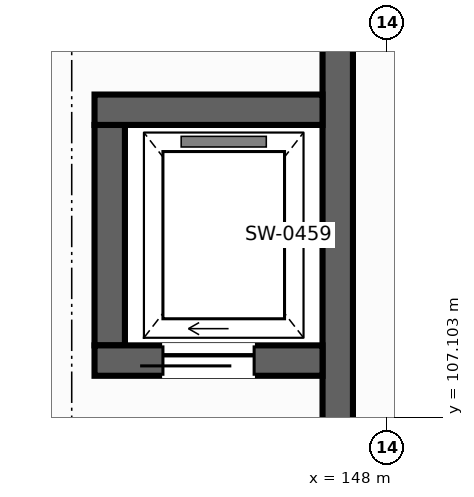
"""IFC4 building model, lengths in metres.
Left out: names, types, materials, properties, quantities, classifications, styles, units other than length and angle.
Written with IfcOpenShell. Run it as: python <this file> out.ifc"""

import sys

from ifc_helpers import new_model, si_unit, direction, frame, frame_2d, origin, place, context, subcontext, project, spatial, rectangle, extrude, element, fill, save


model = new_model("IFC4")
c1 = context("Model", 3, precision=1e-05, world=origin(), true_north=direction((0.0, 1.0)))
c2 = subcontext(c1, "Body", "Model", "MODEL_VIEW")
j1 = project(units=[si_unit("LENGTHUNIT", "METRE"), si_unit("PLANEANGLEUNIT", "RADIAN")], contexts=[c1])
p1 = place(None, origin())
s1 = spatial("IfcSite", under=j1, at=p1, CompositionType="ELEMENT")
p2 = place(p1, origin())
s2 = spatial("IfcBuilding", under=s1, at=p2, CompositionType="ELEMENT")
p3 = place(p2, frame((0.0, 0.0, 4.5)))
s3 = spatial("IfcBuildingStorey", under=s2, at=p3, CompositionType="ELEMENT", Elevation=4.5)
p4 = place(p3, frame((147.35, 107.0, 0.0), z_axis=(0.0, 0.0, 1.0), x_axis=(0.0, 1.0, 0.0)))
e1 = element("IfcWall", 1, at=p4, inside=s3, PredefinedType="SHEAR", context=c2, shape_type="SweptSolid", body=[
    extrude(rectangle(XDim=5.0, YDim=0.4, at=frame_2d((2.5, 0.0))), origin(), (0.0, 0.0, 1.0), 4.25),
])
p5 = place(p3, frame((144.35, 108.05, 0.0), z_axis=(0.0, 0.0, 1.0), x_axis=(0.0, 1.0, 0.0)))
e2 = element("IfcWall", 2, at=p5, inside=s3, PredefinedType="SHEAR", context=c2, shape_type="SweptSolid", body=[
    extrude(rectangle(XDim=2.9, YDim=0.4, at=frame_2d((1.45, 0.0))), origin(), (0.0, 0.0, 1.0), 4.25),
])
p6 = place(p3, frame((144.15, 107.85, 0.0), z_axis=(0.0, 0.0, 1.0), x_axis=(1.0, 0.0, 0.0)))
e3 = element("IfcWall", 3, at=p6, inside=s3, PredefinedType="SHEAR", context=c2, shape_type="SweptSolid", body=[
    extrude(rectangle(XDim=3.0, YDim=0.4, at=frame_2d((1.5, 0.0))), origin(), (0.0, 0.0, 1.0), 4.25),
])
p7 = place(p6, frame((0.9, 0.0, 0.0)))
e4 = element("IfcOpeningElement", 4, at=p7, cuts=e3, PredefinedType="OPENING", context=c2, shape_type="SweptSolid", body=[
    extrude(rectangle(XDim=1.2, YDim=2.2, at=frame_2d((0.6, 1.1))), frame((0.0, 0.21, 0.0), z_axis=(0.0, -1.0, 0.0), x_axis=(1.0, 0.0, 0.0)), (0.0, 0.0, 1.0), 0.42),
])
p8 = place(p3, frame((144.15, 111.15, 0.0), z_axis=(0.0, 0.0, 1.0), x_axis=(1.0, 0.0, 0.0)))
e5 = element("IfcWall", 5, at=p8, inside=s3, PredefinedType="SHEAR", context=c2, shape_type="SweptSolid", body=[
    extrude(rectangle(XDim=3.0, YDim=0.4, at=frame_2d((1.5, 0.0))), origin(), (0.0, 0.0, 1.0), 4.25),
])
p9 = place(p7, origin())
e6 = element("IfcDoor", 6, at=p9, inside=s3, OperationType="SLIDING_TO_LEFT", PredefinedType="DOOR", context=c2, shape_type="SweptSolid", body=[
    extrude(rectangle(XDim=1.2, YDim=2.2, at=frame_2d((0.6, 1.1))), frame((0.0, 0.025, 0.0), z_axis=(0.0, -1.0, 0.0), x_axis=(1.0, 0.0, 0.0)), (0.0, 0.0, 1.0), 0.05),
])
fill(e4, e6)
save(model, sys.argv[1])
